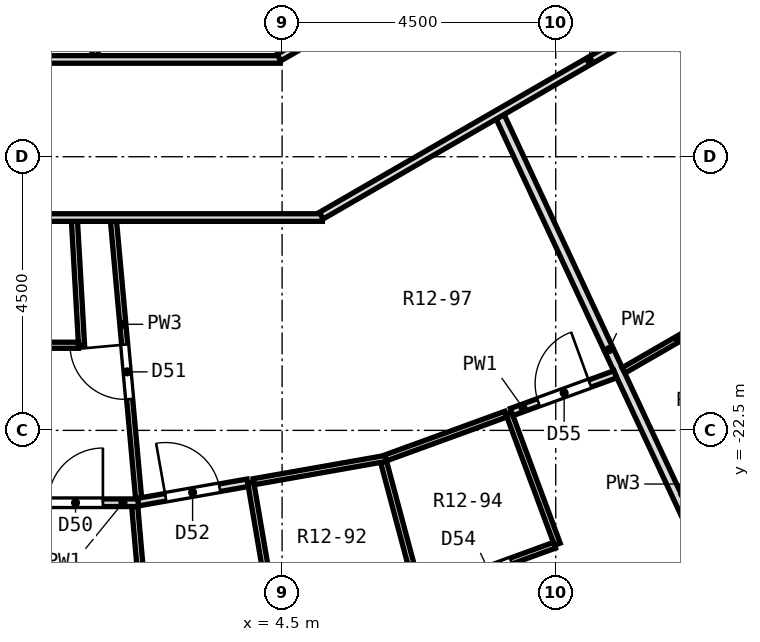
"""IFC4 building model, lengths in metres.
Left out: names, types, materials, properties, quantities, classifications, styles, units other than length and angle.
Written with IfcOpenShell. Run it as: python <this file> out.ifc"""

import sys

from ifc_helpers import new_model, si_unit, direction, frame, frame_2d, origin, place, context, subcontext, project, spatial, rectangle, extrude, element, fill, save


model = new_model("IFC4")
c1 = context("Model", 3, precision=1e-05, world=origin(), true_north=direction((0.0, 1.0)))
c2 = subcontext(c1, "Body", "Model", "MODEL_VIEW")
j1 = project(units=[si_unit("LENGTHUNIT", "METRE"), si_unit("PLANEANGLEUNIT", "RADIAN")], contexts=[c1])
p1 = place(None, origin())
s1 = spatial("IfcSite", under=j1, at=p1, CompositionType="ELEMENT")
p2 = place(p1, origin())
s2 = spatial("IfcBuilding", under=s1, at=p2, CompositionType="ELEMENT")
p3 = place(p2, frame((0.0, 0.0, 56.0)))
s3 = spatial("IfcBuildingStorey", under=s2, at=p3, CompositionType="ELEMENT", Elevation=56.0)
p4 = place(p3, frame((1.085, -19.062, 0.0), z_axis=(0.0, 0.0, 1.0), x_axis=(0.057060010535, -0.998370750372, 0.0)))
e1 = element("IfcWall", 1, at=p4, inside=s3, PredefinedType="PARTITIONING", context=c2, shape_type="SweptSolid", body=[
    extrude(rectangle(XDim=2.041, YDim=0.1, at=frame_2d((1.021, 0.0))), origin(), (0.0, 0.0, 1.0), 2.75),
])
p5 = place(p3, frame((2.077, -23.752, 0.0), z_axis=(0.0, 0.0, 1.0), x_axis=(0.087439331166, -0.996169846645, 0.0)))
e2 = element("IfcWall", 2, at=p5, inside=s3, PredefinedType="PARTITIONING", context=c2, shape_type="SweptSolid", body=[
    extrude(rectangle(XDim=3.747, YDim=0.1, at=frame_2d((1.874, 0.0))), origin(), (0.0, 0.0, 1.0), 2.75),
])
p6 = place(p3, frame((1.067, -12.2, 0.0), z_axis=(0.0, 0.0, 1.0), x_axis=(0.08728141995, -0.996183694773, 0.0)))
e3 = element("IfcWall", 3, at=p6, inside=s3, PredefinedType="PARTITIONING", context=c2, shape_type="SweptSolid", body=[
    extrude(rectangle(XDim=4.154, YDim=0.1, at=frame_2d((2.077, 0.0))), origin(), (0.0, 0.0, 1.0), 2.75),
])
p7 = place(p3, frame((1.728, -19.062, 0.0), z_axis=(0.0, 0.0, 1.0), x_axis=(0.090314228744, -0.995913319565, 0.0)))
e4 = element("IfcWall", 4, at=p7, inside=s3, PredefinedType="PARTITIONING", context=c2, shape_type="SweptSolid", body=[
    extrude(rectangle(XDim=4.571, YDim=0.1, at=frame_2d((2.286, 0.0))), origin(), (0.0, 0.0, 1.0), 2.75),
])
p8 = place(p7, frame((2.036, 0.0, 0.0)))
e5 = element("IfcOpeningElement", 5, at=p8, cuts=e4, PredefinedType="OPENING", context=c2, shape_type="SweptSolid", body=[
    extrude(rectangle(XDim=0.9, YDim=2.1, at=frame_2d((0.45, 1.05))), frame((0.0, 0.062, 0.0), z_axis=(0.0, -1.0, 0.0), x_axis=(1.0, 0.0, 0.0)), (0.0, 0.0, 1.0), 0.124),
])
p9 = place(p3, frame((3.983, -23.353, 0.0), z_axis=(0.0, 0.0, 1.0), x_axis=(0.168356840278, -0.985726115273, 0.0)))
e6 = element("IfcWall", 6, at=p9, inside=s3, PredefinedType="PARTITIONING", context=c2, shape_type="SweptSolid", body=[
    extrude(rectangle(XDim=2.3, YDim=0.1, at=frame_2d((1.15, 0.0))), origin(), (0.0, 0.0, 1.0), 2.75),
])
p10 = place(p3, frame((6.169, -23.018, 0.0), z_axis=(0.0, 0.0, 1.0), x_axis=(0.258074907141, -0.966124910301, 0.0)))
e7 = element("IfcWall", 7, at=p10, inside=s3, PredefinedType="PARTITIONING", context=c2, shape_type="SweptSolid", body=[
    extrude(rectangle(XDim=3.76, YDim=0.1, at=frame_2d((1.88, 0.0))), origin(), (0.0, 0.0, 1.0), 2.75),
])
p11 = place(p3, frame((8.227, -22.216, 0.0), z_axis=(0.0, 0.0, 1.0), x_axis=(0.347431936108, -0.937705204087, 0.0)))
e8 = element("IfcWall", 8, at=p11, inside=s3, PredefinedType="PARTITIONING", context=c2, shape_type="SweptSolid", body=[
    extrude(rectangle(XDim=2.299, YDim=0.1, at=frame_2d((1.15, 0.0))), origin(), (0.0, 0.0, 1.0), 2.75),
])
p12 = place(p3, frame((8.086, -17.343, 0.0), z_axis=(0.0, 0.0, 1.0), x_axis=(0.422898111985, -0.906177238116, 0.0)))
e9 = element("IfcWall", 9, at=p12, inside=s3, PredefinedType="PARTITIONING", context=c2, shape_type="SweptSolid", body=[
    extrude(rectangle(XDim=8.455, YDim=0.15, at=frame_2d((4.227, 0.0))), origin(), (0.0, 0.0, 1.0), 2.75),
])
p13 = place(p3, frame((0.183, -23.69, 0.0), z_axis=(0.0, 0.0, 1.0), x_axis=(1.0, 0.0, 0.0)))
e10 = element("IfcWall", 10, at=p13, inside=s3, PredefinedType="PARTITIONING", context=c2, shape_type="SweptSolid", body=[
    extrude(rectangle(XDim=1.953, YDim=0.125, at=frame_2d((0.977, 0.0))), origin(), (0.0, 0.0, 1.0), 2.75),
])
p14 = place(p13, frame((0.47, 0.0, 0.0)))
e11 = element("IfcOpeningElement", 11, at=p14, cuts=e10, PredefinedType="OPENING", context=c2, shape_type="SweptSolid", body=[
    extrude(rectangle(XDim=0.9, YDim=2.1, at=frame_2d((0.45, 1.05))), frame((0.0, 0.074, 0.0), z_axis=(0.0, -1.0, 0.0), x_axis=(1.0, 0.0, 0.0)), (0.0, 0.0, 1.0), 0.149),
])
p15 = place(p3, frame((-0.921, -21.1, 0.0), z_axis=(0.0, 0.0, 1.0), x_axis=(1.0, 0.0, 0.0)))
e12 = element("IfcWall", 12, at=p15, inside=s3, PredefinedType="PARTITIONING", context=c2, shape_type="SweptSolid", body=[
    extrude(rectangle(XDim=2.073, YDim=0.1, at=frame_2d((1.037, 0.0))), origin(), (0.0, 0.0, 1.0), 2.75),
])
p16 = place(p15, frame((0.662, 0.0, 0.0)))
e13 = element("IfcOpeningElement", 13, at=p16, cuts=e12, PredefinedType="OPENING", context=c2, shape_type="SweptSolid", body=[
    extrude(rectangle(XDim=0.8, YDim=2.1, at=frame_2d((0.4, 1.05))), frame((0.0, 0.062, 0.0), z_axis=(0.0, -1.0, 0.0), x_axis=(1.0, 0.0, 0.0)), (0.0, 0.0, 1.0), 0.124),
])
p17 = place(p3, frame((-5.029, -19.0, 0.0), z_axis=(0.0, 0.0, 1.0), x_axis=(1.0, 0.0, 0.0)))
e14 = element("IfcWall", 14, at=p17, inside=s3, PredefinedType="PARTITIONING", context=c2, shape_type="SweptSolid", body=[
    extrude(rectangle(XDim=10.192, YDim=0.125, at=frame_2d((5.096, 0.0))), origin(), (0.0, 0.0, 1.0), 2.75),
])
p18 = place(p17, frame((1.568, 0.0, 0.0)))
e15 = element("IfcOpeningElement", 15, at=p18, cuts=e14, PredefinedType="OPENING", context=c2, shape_type="SweptSolid", body=[
    extrude(rectangle(XDim=1.0, YDim=2.1, at=frame_2d((0.5, 1.05))), frame((0.0, 0.074, 0.0), z_axis=(0.0, -1.0, 0.0), x_axis=(1.0, 0.0, 0.0)), (0.0, 0.0, 1.0), 0.149),
])
p19 = place(p3, frame((-4.332, -16.4, 0.0), z_axis=(0.0, 0.0, 1.0), x_axis=(1.0, 0.0, 0.0)))
e16 = element("IfcWall", 16, at=p19, inside=s3, PredefinedType="PARTITIONING", context=c2, shape_type="SweptSolid", body=[
    extrude(rectangle(XDim=8.798, YDim=0.125, at=frame_2d((4.399, 0.0))), origin(), (0.0, 0.0, 1.0), 2.75),
])
p20 = place(p3, frame((4.032, -23.344, 0.0), z_axis=(0.0, 0.0, 1.0), x_axis=(0.98481362095, 0.173614895648, 0.0)))
e17 = element("IfcWall", 17, at=p20, inside=s3, PredefinedType="PARTITIONING", context=c2, shape_type="SweptSolid", body=[
    extrude(rectangle(XDim=2.206, YDim=0.1, at=frame_2d((1.103, 0.0))), origin(), (0.0, 0.0, 1.0), 2.75),
])
p21 = place(p3, frame((2.135, -23.679, 0.0), z_axis=(0.0, 0.0, 1.0), x_axis=(0.984774141248, 0.173838691691, 0.0)))
e18 = element("IfcWall", 18, at=p21, inside=s3, PredefinedType="PARTITIONING", context=c2, shape_type="SweptSolid", body=[
    extrude(rectangle(XDim=1.827, YDim=0.125, at=frame_2d((0.914, 0.0))), origin(), (0.0, 0.0, 1.0), 2.75),
])
p22 = place(p21, frame((0.457, 0.0, 0.0)))
e19 = element("IfcOpeningElement", 19, at=p22, cuts=e18, PredefinedType="OPENING", context=c2, shape_type="SweptSolid", body=[
    extrude(rectangle(XDim=0.9, YDim=2.1, at=frame_2d((0.45, 1.05))), frame((0.0, 0.074, 0.0), z_axis=(0.0, -1.0, 0.0), x_axis=(1.0, 0.0, 0.0)), (0.0, 0.0, 1.0), 0.149),
])
p23 = place(p3, frame((6.799, -25.183, 0.0), z_axis=(0.0, 0.0, 1.0), x_axis=(0.939655079874, 0.342123268526, 0.0)))
e20 = element("IfcWall", 20, at=p23, inside=s3, PredefinedType="PARTITIONING", context=c2, shape_type="SweptSolid", body=[
    extrude(rectangle(XDim=2.32, YDim=0.1, at=frame_2d((1.16, 0.0))), origin(), (0.0, 0.0, 1.0), 2.75),
])
p24 = place(p23, frame((0.76, 0.0, 0.0)))
e21 = element("IfcOpeningElement", 21, at=p24, cuts=e20, PredefinedType="OPENING", context=c2, shape_type="SweptSolid", body=[
    extrude(rectangle(XDim=0.8, YDim=2.1, at=frame_2d((0.4, 1.05))), frame((0.0, 0.062, 0.0), z_axis=(0.0, -1.0, 0.0), x_axis=(1.0, 0.0, 0.0)), (0.0, 0.0, 1.0), 0.124),
])
p25 = place(p3, frame((6.202, -22.953, 0.0), z_axis=(0.0, 0.0, 1.0), x_axis=(0.939725675468, 0.341929312674, 0.0)))
e22 = element("IfcWall", 22, at=p25, inside=s3, PredefinedType="PARTITIONING", context=c2, shape_type="SweptSolid", body=[
    extrude(rectangle(XDim=2.105, YDim=0.1, at=frame_2d((1.052, 0.0))), origin(), (0.0, 0.0, 1.0), 2.75),
])
p26 = place(p3, frame((8.274, -22.199, 0.0), z_axis=(0.0, 0.0, 1.0), x_axis=(0.939592989856, 0.342293753104, 0.0)))
e23 = element("IfcWall", 23, at=p26, inside=s3, PredefinedType="PARTITIONING", context=c2, shape_type="SweptSolid", body=[
    extrude(rectangle(XDim=1.815, YDim=0.125, at=frame_2d((0.908, 0.0))), origin(), (0.0, 0.0, 1.0), 2.75),
])
p27 = place(p26, frame((0.47, 0.0, 0.0)))
e24 = element("IfcOpeningElement", 24, at=p27, cuts=e23, PredefinedType="OPENING", context=c2, shape_type="SweptSolid", body=[
    extrude(rectangle(XDim=0.9, YDim=2.1, at=frame_2d((0.45, 1.05))), frame((0.0, 0.074, 0.0), z_axis=(0.0, -1.0, 0.0), x_axis=(1.0, 0.0, 0.0)), (0.0, 0.0, 1.0), 0.149),
])
p28 = place(p3, frame((10.115, -21.514, 0.0), z_axis=(0.0, 0.0, 1.0), x_axis=(0.865967335607, 0.500100563549, 0.0)))
e25 = element("IfcWall", 25, at=p28, inside=s3, PredefinedType="PARTITIONING", context=c2, shape_type="SweptSolid", body=[
    extrude(rectangle(XDim=2.068, YDim=0.1, at=frame_2d((1.034, 0.0))), origin(), (0.0, 0.0, 1.0), 2.75),
])
p29 = place(p3, frame((5.145, -18.969, 0.0), z_axis=(0.0, 0.0, 1.0), x_axis=(0.866024825845, 0.50000100102, 0.0)))
e26 = element("IfcWall", 26, at=p29, inside=s3, PredefinedType="PARTITIONING", context=c2, shape_type="SweptSolid", body=[
    extrude(rectangle(XDim=10.192, YDim=0.125, at=frame_2d((5.096, 0.0))), origin(), (0.0, 0.0, 1.0), 2.75),
])
p30 = place(p29, frame((6.243, 0.0, 0.0)))
e27 = element("IfcOpeningElement", 27, at=p30, cuts=e26, PredefinedType="OPENING", context=c2, shape_type="SweptSolid", body=[
    extrude(rectangle(XDim=1.0, YDim=2.1, at=frame_2d((0.5, 1.05))), frame((0.0, 0.074, 0.0), z_axis=(0.0, -1.0, 0.0), x_axis=(1.0, 0.0, 0.0)), (0.0, 0.0, 1.0), 0.149),
])
p31 = place(p3, frame((4.448, -16.369, 0.0), z_axis=(0.0, 0.0, 1.0), x_axis=(0.866072505035, 0.499918409365, 0.0)))
e28 = element("IfcWall", 28, at=p31, inside=s3, PredefinedType="PARTITIONING", context=c2, shape_type="SweptSolid", body=[
    extrude(rectangle(XDim=8.664, YDim=0.125, at=frame_2d((4.332, 0.0))), origin(), (0.0, 0.0, 1.0), 2.75),
])
p32 = place(p31, frame((3.882, 0.0, 0.0)))
e29 = element("IfcOpeningElement", 29, at=p32, cuts=e28, PredefinedType="OPENING", context=c2, shape_type="SweptSolid", body=[
    extrude(rectangle(XDim=0.9, YDim=2.1, at=frame_2d((0.45, 1.05))), frame((0.0, 0.074, 0.0), z_axis=(0.0, -1.0, 0.0), x_axis=(1.0, 0.0, 0.0)), (0.0, 0.0, 1.0), 0.149),
])
p33 = place(p14, origin())
e30 = element("IfcDoor", 30, at=p33, inside=s3, OperationType="SINGLE_SWING_RIGHT", PredefinedType="DOOR", context=c2, shape_type="SweptSolid", body=[
    extrude(rectangle(XDim=0.9, YDim=2.1, at=frame_2d((0.45, 1.05))), frame((0.0, 0.025, 0.0), z_axis=(0.0, -1.0, 0.0), x_axis=(1.0, 0.0, 0.0)), (0.0, 0.0, 1.0), 0.05),
])
fill(e11, e30)
p34 = place(p8, frame((0.9, 0.0, 0.0), z_axis=(0.0, 0.0, 1.0), x_axis=(-1.0, 0.0, 0.0)))
e31 = element("IfcDoor", 31, at=p34, inside=s3, OperationType="SINGLE_SWING_RIGHT", PredefinedType="DOOR", context=c2, shape_type="SweptSolid", body=[
    extrude(rectangle(XDim=0.9, YDim=2.1, at=frame_2d((0.45, 1.05))), frame((0.0, 0.025, 0.0), z_axis=(0.0, -1.0, 0.0), x_axis=(1.0, 0.0, 0.0)), (0.0, 0.0, 1.0), 0.05),
])
fill(e5, e31)
p35 = place(p22, origin())
e32 = element("IfcDoor", 32, at=p35, inside=s3, OperationType="SINGLE_SWING_LEFT", PredefinedType="DOOR", context=c2, shape_type="SweptSolid", body=[
    extrude(rectangle(XDim=0.9, YDim=2.1, at=frame_2d((0.45, 1.05))), frame((0.0, 0.025, 0.0), z_axis=(0.0, -1.0, 0.0), x_axis=(1.0, 0.0, 0.0)), (0.0, 0.0, 1.0), 0.05),
])
fill(e19, e32)
p36 = place(p24, frame((0.8, 0.0, 0.0), z_axis=(0.0, 0.0, 1.0), x_axis=(-1.0, 0.0, 0.0)))
e33 = element("IfcDoor", 33, at=p36, inside=s3, OperationType="SINGLE_SWING_RIGHT", PredefinedType="DOOR", context=c2, shape_type="SweptSolid", body=[
    extrude(rectangle(XDim=0.8, YDim=2.1, at=frame_2d((0.4, 1.05))), frame((0.0, 0.025, 0.0), z_axis=(0.0, -1.0, 0.0), x_axis=(1.0, 0.0, 0.0)), (0.0, 0.0, 1.0), 0.05),
])
fill(e21, e33)
p37 = place(p27, origin())
e34 = element("IfcDoor", 34, at=p37, inside=s3, OperationType="SINGLE_SWING_RIGHT", PredefinedType="DOOR", context=c2, shape_type="SweptSolid", body=[
    extrude(rectangle(XDim=0.9, YDim=2.1, at=frame_2d((0.45, 1.05))), frame((0.0, 0.025, 0.0), z_axis=(0.0, -1.0, 0.0), x_axis=(1.0, 0.0, 0.0)), (0.0, 0.0, 1.0), 0.05),
])
fill(e24, e34)
save(model, sys.argv[1])
